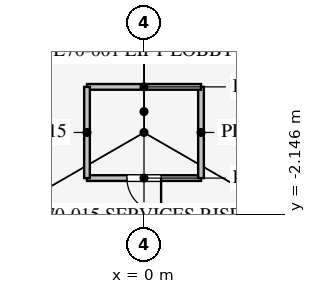
"""IFC4 building model, lengths in metres.
Left out: names, types, materials, properties, quantities, classifications, styles, units other than length and angle.
Written with IfcOpenShell. Run it as: python <this file> out.ifc"""

import sys

from ifc_helpers import new_model, si_unit, direction, frame, frame_2d, origin, place, context, subcontext, project, spatial, rectangle, extrude, element, fill, save


model = new_model("IFC4")
c1 = context("Model", 3, precision=1e-05, world=origin(), true_north=direction((0.0, 1.0)))
c2 = subcontext(c1, "Body", "Model", "MODEL_VIEW")
j1 = project(units=[si_unit("LENGTHUNIT", "METRE"), si_unit("PLANEANGLEUNIT", "RADIAN")], contexts=[c1])
p1 = place(None, origin())
s1 = spatial("IfcSite", under=j1, at=p1, CompositionType="ELEMENT")
p2 = place(p1, origin())
s2 = spatial("IfcBuilding", under=s1, at=p2, CompositionType="ELEMENT")
p3 = place(p2, frame((0.0, 0.0, 305.7)))
s3 = spatial("IfcBuildingStorey", under=s2, at=p3, CompositionType="ELEMENT", Elevation=305.7)
p4 = place(p3, frame((-1.5, -1.2, 0.0), z_axis=(0.0, 0.0, 1.0), x_axis=(1.0, 0.0, 0.0)))
e1 = element("IfcWall", 1, at=p4, inside=s3, PredefinedType="PARTITIONING", context=c2, shape_type="SweptSolid", body=[
    extrude(rectangle(XDim=3.0, YDim=0.15, at=frame_2d((1.5, 0.0))), origin(), (0.0, 0.0, 1.0), 4.0),
])
p5 = place(p4, frame((1.05, 0.0, 0.0)))
e2 = element("IfcOpeningElement", 2, at=p5, cuts=e1, PredefinedType="OPENING", context=c2, shape_type="SweptSolid", body=[
    extrude(rectangle(XDim=0.9, YDim=2.1, at=frame_2d((0.45, 1.05))), frame((0.0, 0.085, 0.0), z_axis=(0.0, -1.0, 0.0), x_axis=(1.0, 0.0, 0.0)), (0.0, 0.0, 1.0), 0.17),
])
p6 = place(p3, frame((1.5, -1.2, 0.0), z_axis=(0.0, 0.0, 1.0), x_axis=(0.0, 1.0, 0.0)))
e3 = element("IfcWall", 3, at=p6, inside=s3, PredefinedType="PARTITIONING", context=c2, shape_type="SweptSolid", body=[
    extrude(rectangle(XDim=2.4, YDim=0.15, at=frame_2d((1.2, 0.0))), origin(), (0.0, 0.0, 1.0), 4.0),
])
p7 = place(p3, frame((1.5, 1.2, 0.0), z_axis=(0.0, 0.0, 1.0), x_axis=(-1.0, 0.0, 0.0)))
e4 = element("IfcWall", 4, at=p7, inside=s3, PredefinedType="PARTITIONING", context=c2, shape_type="SweptSolid", body=[
    extrude(rectangle(XDim=3.0, YDim=0.15, at=frame_2d((1.5, 0.0))), origin(), (0.0, 0.0, 1.0), 4.0),
])
p8 = place(p3, frame((-1.5, 1.2, 0.0), z_axis=(0.0, 0.0, 1.0), x_axis=(0.0, -1.0, 0.0)))
e5 = element("IfcWall", 5, at=p8, inside=s3, PredefinedType="PARTITIONING", context=c2, shape_type="SweptSolid", body=[
    extrude(rectangle(XDim=2.4, YDim=0.15, at=frame_2d((1.2, 0.0))), origin(), (0.0, 0.0, 1.0), 4.0),
])
p9 = place(p5, frame((0.9, 0.0, 0.0), z_axis=(0.0, 0.0, 1.0), x_axis=(-1.0, 0.0, 0.0)))
e6 = element("IfcDoor", 6, at=p9, inside=s3, OperationType="SINGLE_SWING_LEFT", PredefinedType="DOOR", context=c2, shape_type="SweptSolid", body=[
    extrude(rectangle(XDim=0.9, YDim=2.1, at=frame_2d((0.45, 1.05))), frame((0.0, 0.025, 0.0), z_axis=(0.0, -1.0, 0.0), x_axis=(1.0, 0.0, 0.0)), (0.0, 0.0, 1.0), 0.05),
])
fill(e2, e6)
save(model, sys.argv[1])
